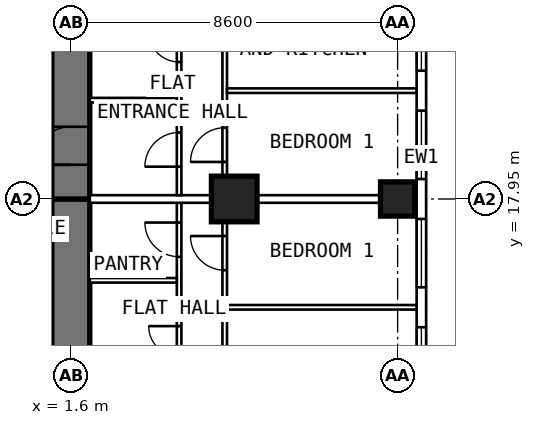
"""IFC4 building model, lengths in metres.
Left out: names, types, materials, properties, quantities, classifications, styles, units other than length and angle.
Written with IfcOpenShell. Run it as: python <this file> out.ifc"""

import sys

from ifc_helpers import new_model, si_unit, direction, frame, frame_2d, origin, origin_2d, place, context, subcontext, project, spatial, rectangle, extrude, element, fill, save


model = new_model("IFC4")
c1 = context("Model", 3, precision=1e-05, world=origin(), true_north=direction((0.0, 1.0)))
c2 = subcontext(c1, "Body", "Model", "MODEL_VIEW")
j1 = project(units=[si_unit("LENGTHUNIT", "METRE"), si_unit("PLANEANGLEUNIT", "RADIAN")], contexts=[c1])
p1 = place(None, origin())
s1 = spatial("IfcSite", under=j1, at=p1, CompositionType="ELEMENT")
p2 = place(p1, origin())
s2 = spatial("IfcBuilding", under=s1, at=p2, CompositionType="ELEMENT")
p3 = place(p2, frame((0.0, 0.0, 91.6)))
s3 = spatial("IfcBuildingStorey", under=s2, at=p3, CompositionType="ELEMENT", Elevation=91.6)
p4 = place(p3, frame((10.2, 17.95, 0.0), z_axis=(0.0, 0.0, 1.0), x_axis=(0.0, 1.0, 0.0)))
e1 = element("IfcColumn", 1, at=p4, inside=s3, PredefinedType="COLUMN", context=c2, shape_type="SweptSolid", body=[
    extrude(rectangle(XDim=0.9, YDim=0.9, at=origin_2d()), origin(), (0.0, 0.0, 1.0), 3.6),
])
p5 = place(p3, frame((5.9, 17.95, 0.0), z_axis=(0.0, 0.0, 1.0), x_axis=(0.0, 1.0, 0.0)))
e2 = element("IfcColumn", 2, at=p5, inside=s3, PredefinedType="COLUMN", context=c2, shape_type="SweptSolid", body=[
    extrude(rectangle(XDim=1.2, YDim=1.2, at=origin_2d()), origin(), (0.0, 0.0, 1.0), 3.6),
])
p6 = place(p3, frame((1.6, 9.6, 0.0), z_axis=(0.0, 0.0, 1.0), x_axis=(0.0, 1.0, 0.0)))
e3 = element("IfcWall", 3, at=p6, inside=s3, PredefinedType="SHEAR", context=c2, shape_type="SweptSolid", body=[
    extrude(rectangle(XDim=8.35, YDim=1.0, at=frame_2d((4.175, 0.0))), origin(), (0.0, 0.0, 1.0), 3.6),
])
p7 = place(p6, frame((1.3, 0.0, 0.0)))
e4 = element("IfcOpeningElement", 4, at=p7, cuts=e3, PredefinedType="OPENING", context=c2, shape_type="SweptSolid", body=[
    extrude(rectangle(XDim=1.0, YDim=2.1, at=frame_2d((0.5, 1.05))), frame((0.0, 0.512, 0.0), z_axis=(0.0, -1.0, 0.0), x_axis=(1.0, 0.0, 0.0)), (0.0, 0.0, 1.0), 1.024),
])
p8 = place(p3, frame((1.6, 17.95, 0.0), z_axis=(0.0, 0.0, 1.0), x_axis=(0.0, 1.0, 0.0)))
e5 = element("IfcWall", 5, at=p8, inside=s3, PredefinedType="SHEAR", context=c2, shape_type="SweptSolid", body=[
    extrude(rectangle(XDim=5.7, YDim=1.0, at=frame_2d((2.85, 0.0))), origin(), (0.0, 0.0, 1.0), 3.6),
])
p9 = place(p8, frame((0.9, 0.0, 0.0)))
e6 = element("IfcOpeningElement", 6, at=p9, cuts=e5, PredefinedType="OPENING", context=c2, shape_type="SweptSolid", body=[
    extrude(rectangle(XDim=1.0, YDim=2.1, at=frame_2d((0.5, 1.05))), frame((0.0, 0.512, 0.0), z_axis=(0.0, -1.0, 0.0), x_axis=(1.0, 0.0, 0.0)), (0.0, 0.0, 1.0), 1.024),
])
p10 = place(p3, frame((10.825, 6.409, 0.0), z_axis=(0.0, 0.0, 1.0), x_axis=(0.0, 1.0, 0.0)))
e7 = element("IfcWall", 7, at=p10, inside=s3, PredefinedType="SOLIDWALL", context=c2, shape_type="SweptSolid", body=[
    extrude(rectangle(XDim=25.226, YDim=0.25, at=frame_2d((12.613, 0.0))), origin(), (0.0, 0.0, 1.0), 3.35),
])
p11 = place(p10, frame((0.666, 0.0, 0.8)))
e8 = element("IfcOpeningElement", 8, at=p11, cuts=e7, PredefinedType="OPENING", context=c2, shape_type="SweptSolid", body=[
    extrude(rectangle(XDim=1.8, YDim=1.8, at=frame_2d((0.9, 0.9))), frame((0.0, 0.137, 0.0), z_axis=(0.0, -1.0, 0.0), x_axis=(1.0, 0.0, 0.0)), (0.0, 0.0, 1.0), 0.274),
])
p12 = place(p10, frame((3.516, 0.0, 0.8)))
e9 = element("IfcOpeningElement", 9, at=p12, cuts=e7, PredefinedType="OPENING", context=c2, shape_type="SweptSolid", body=[
    extrude(rectangle(XDim=1.8, YDim=1.8, at=frame_2d((0.9, 0.9))), frame((0.0, 0.137, 0.0), z_axis=(0.0, -1.0, 0.0), x_axis=(1.0, 0.0, 0.0)), (0.0, 0.0, 1.0), 0.274),
])
p13 = place(p10, frame((6.366, 0.0, 0.8)))
e10 = element("IfcOpeningElement", 10, at=p13, cuts=e7, PredefinedType="OPENING", context=c2, shape_type="SweptSolid", body=[
    extrude(rectangle(XDim=1.8, YDim=1.8, at=frame_2d((0.9, 0.9))), frame((0.0, 0.137, 0.0), z_axis=(0.0, -1.0, 0.0), x_axis=(1.0, 0.0, 0.0)), (0.0, 0.0, 1.0), 0.274),
])
p14 = place(p10, frame((9.216, 0.0, 0.8)))
e11 = element("IfcOpeningElement", 11, at=p14, cuts=e7, PredefinedType="OPENING", context=c2, shape_type="SweptSolid", body=[
    extrude(rectangle(XDim=1.8, YDim=1.8, at=frame_2d((0.9, 0.9))), frame((0.0, 0.137, 0.0), z_axis=(0.0, -1.0, 0.0), x_axis=(1.0, 0.0, 0.0)), (0.0, 0.0, 1.0), 0.274),
])
p15 = place(p10, frame((12.066, 0.0, 0.8)))
e12 = element("IfcOpeningElement", 12, at=p15, cuts=e7, PredefinedType="OPENING", context=c2, shape_type="SweptSolid", body=[
    extrude(rectangle(XDim=1.8, YDim=1.8, at=frame_2d((0.9, 0.9))), frame((0.0, 0.137, 0.0), z_axis=(0.0, -1.0, 0.0), x_axis=(1.0, 0.0, 0.0)), (0.0, 0.0, 1.0), 0.274),
])
p16 = place(p10, frame((14.916, 0.0, 0.8)))
e13 = element("IfcOpeningElement", 13, at=p16, cuts=e7, PredefinedType="OPENING", context=c2, shape_type="SweptSolid", body=[
    extrude(rectangle(XDim=1.8, YDim=1.8, at=frame_2d((0.9, 0.9))), frame((0.0, 0.137, 0.0), z_axis=(0.0, -1.0, 0.0), x_axis=(1.0, 0.0, 0.0)), (0.0, 0.0, 1.0), 0.274),
])
p17 = place(p10, frame((17.766, 0.0, 0.8)))
e14 = element("IfcOpeningElement", 14, at=p17, cuts=e7, PredefinedType="OPENING", context=c2, shape_type="SweptSolid", body=[
    extrude(rectangle(XDim=1.8, YDim=1.8, at=frame_2d((0.9, 0.9))), frame((0.0, 0.137, 0.0), z_axis=(0.0, -1.0, 0.0), x_axis=(1.0, 0.0, 0.0)), (0.0, 0.0, 1.0), 0.274),
])
p18 = place(p10, frame((20.616, 0.0, 0.8)))
e15 = element("IfcOpeningElement", 15, at=p18, cuts=e7, PredefinedType="OPENING", context=c2, shape_type="SweptSolid", body=[
    extrude(rectangle(XDim=1.8, YDim=1.8, at=frame_2d((0.9, 0.9))), frame((0.0, 0.137, 0.0), z_axis=(0.0, -1.0, 0.0), x_axis=(1.0, 0.0, 0.0)), (0.0, 0.0, 1.0), 0.274),
])
p19 = place(p3, frame((4.45, 10.1, 0.0), z_axis=(0.0, 0.0, 1.0), x_axis=(0.0, 1.0, 0.0)))
e16 = element("IfcWall", 16, at=p19, inside=s3, PredefinedType="PARTITIONING", context=c2, shape_type="SweptSolid", body=[
    extrude(rectangle(XDim=7.75, YDim=0.12, at=frame_2d((3.875, 0.0))), origin(), (0.0, 0.0, 1.0), 3.35),
])
p20 = place(p19, frame((0.75, 0.0, 0.0)))
e17 = element("IfcOpeningElement", 17, at=p20, cuts=e16, PredefinedType="OPENING", context=c2, shape_type="SweptSolid", body=[
    extrude(rectangle(XDim=0.9, YDim=2.1, at=frame_2d((0.45, 1.05))), frame((0.0, 0.072, 0.0), z_axis=(0.0, -1.0, 0.0), x_axis=(1.0, 0.0, 0.0)), (0.0, 0.0, 1.0), 0.144),
])
p21 = place(p19, frame((3.705, 0.0, 0.0)))
e18 = element("IfcOpeningElement", 18, at=p21, cuts=e16, PredefinedType="OPENING", context=c2, shape_type="SweptSolid", body=[
    extrude(rectangle(XDim=0.8, YDim=2.1, at=frame_2d((0.4, 1.05))), frame((0.0, 0.072, 0.0), z_axis=(0.0, -1.0, 0.0), x_axis=(1.0, 0.0, 0.0)), (0.0, 0.0, 1.0), 0.144),
])
p22 = place(p19, frame((6.33, 0.0, 0.0)))
e19 = element("IfcOpeningElement", 19, at=p22, cuts=e16, PredefinedType="OPENING", context=c2, shape_type="SweptSolid", body=[
    extrude(rectangle(XDim=0.9, YDim=2.1, at=frame_2d((0.45, 1.05))), frame((0.0, 0.072, 0.0), z_axis=(0.0, -1.0, 0.0), x_axis=(1.0, 0.0, 0.0)), (0.0, 0.0, 1.0), 0.144),
])
p23 = place(p3, frame((5.65, 9.6, 0.0), z_axis=(0.0, 0.0, 1.0), x_axis=(0.0, 1.0, 0.0)))
e20 = element("IfcWall", 20, at=p23, inside=s3, PredefinedType="PARTITIONING", context=c2, shape_type="SweptSolid", body=[
    extrude(rectangle(XDim=8.1, YDim=0.12, at=frame_2d((4.05, 0.0))), origin(), (0.0, 0.0, 1.0), 3.35),
])
p24 = place(p23, frame((3.4, 0.0, 0.0)))
e21 = element("IfcOpeningElement", 21, at=p24, cuts=e20, PredefinedType="OPENING", context=c2, shape_type="SweptSolid", body=[
    extrude(rectangle(XDim=0.9, YDim=2.1, at=frame_2d((0.45, 1.05))), frame((0.0, 0.072, 0.0), z_axis=(0.0, -1.0, 0.0), x_axis=(1.0, 0.0, 0.0)), (0.0, 0.0, 1.0), 0.144),
])
p25 = place(p23, frame((6.475, 0.0, 0.0)))
e22 = element("IfcOpeningElement", 22, at=p25, cuts=e20, PredefinedType="OPENING", context=c2, shape_type="SweptSolid", body=[
    extrude(rectangle(XDim=0.9, YDim=2.1, at=frame_2d((0.45, 1.05))), frame((0.0, 0.072, 0.0), z_axis=(0.0, -1.0, 0.0), x_axis=(1.0, 0.0, 0.0)), (0.0, 0.0, 1.0), 0.144),
])
p26 = place(p3, frame((5.71, 15.1, 0.0), z_axis=(0.0, 0.0, 1.0), x_axis=(1.0, 0.0, 0.0)))
e23 = element("IfcWall", 23, at=p26, inside=s3, PredefinedType="PARTITIONING", context=c2, shape_type="SweptSolid", body=[
    extrude(rectangle(XDim=4.99, YDim=0.12, at=frame_2d((2.495, 0.0))), origin(), (0.0, 0.0, 1.0), 3.35),
])
p27 = place(p3, frame((2.1, 15.81, 0.0), z_axis=(0.0, 0.0, 1.0), x_axis=(1.0, 0.0, 0.0)))
e24 = element("IfcWall", 24, at=p27, inside=s3, PredefinedType="PARTITIONING", context=c2, shape_type="SweptSolid", body=[
    extrude(rectangle(XDim=2.29, YDim=0.12, at=frame_2d((1.145, 0.0))), origin(), (0.0, 0.0, 1.0), 3.35),
])
p28 = place(p3, frame((4.45, 18.05, 0.0), z_axis=(0.0, 0.0, 1.0), x_axis=(0.0, 1.0, 0.0)))
e25 = element("IfcWall", 25, at=p28, inside=s3, PredefinedType="PARTITIONING", context=c2, shape_type="SweptSolid", body=[
    extrude(rectangle(XDim=16.345, YDim=0.12, at=frame_2d((8.172, 0.0))), origin(), (0.0, 0.0, 1.0), 3.35),
])
p29 = place(p28, frame((0.75, 0.0, 0.0)))
e26 = element("IfcOpeningElement", 26, at=p29, cuts=e25, PredefinedType="OPENING", context=c2, shape_type="SweptSolid", body=[
    extrude(rectangle(XDim=0.9, YDim=2.1, at=frame_2d((0.45, 1.05))), frame((0.0, 0.072, 0.0), z_axis=(0.0, -1.0, 0.0), x_axis=(1.0, 0.0, 0.0)), (0.0, 0.0, 1.0), 0.144),
])
p30 = place(p28, frame((3.505, 0.0, 0.0)))
e27 = element("IfcOpeningElement", 27, at=p30, cuts=e25, PredefinedType="OPENING", context=c2, shape_type="SweptSolid", body=[
    extrude(rectangle(XDim=0.8, YDim=2.1, at=frame_2d((0.4, 1.05))), frame((0.0, 0.072, 0.0), z_axis=(0.0, -1.0, 0.0), x_axis=(1.0, 0.0, 0.0)), (0.0, 0.0, 1.0), 0.144),
])
p31 = place(p28, frame((5.847, 0.0, 0.0)))
e28 = element("IfcOpeningElement", 28, at=p31, cuts=e25, PredefinedType="OPENING", context=c2, shape_type="SweptSolid", body=[
    extrude(rectangle(XDim=0.8, YDim=2.1, at=frame_2d((0.4, 1.05))), frame((0.0, 0.072, 0.0), z_axis=(0.0, -1.0, 0.0), x_axis=(1.0, 0.0, 0.0)), (0.0, 0.0, 1.0), 0.144),
])
p32 = place(p28, frame((7.67, 0.0, 0.0)))
e29 = element("IfcOpeningElement", 29, at=p32, cuts=e25, PredefinedType="OPENING", context=c2, shape_type="SweptSolid", body=[
    extrude(rectangle(XDim=0.9, YDim=2.1, at=frame_2d((0.45, 1.05))), frame((0.0, 0.072, 0.0), z_axis=(0.0, -1.0, 0.0), x_axis=(1.0, 0.0, 0.0)), (0.0, 0.0, 1.0), 0.144),
])
p33 = place(p28, frame((9.593, 0.0, 0.0)))
e30 = element("IfcOpeningElement", 30, at=p33, cuts=e25, PredefinedType="OPENING", context=c2, shape_type="SweptSolid", body=[
    extrude(rectangle(XDim=0.8, YDim=2.1, at=frame_2d((0.4, 1.05))), frame((0.0, 0.072, 0.0), z_axis=(0.0, -1.0, 0.0), x_axis=(1.0, 0.0, 0.0)), (0.0, 0.0, 1.0), 0.144),
])
p34 = place(p28, frame((11.467, 0.0, 0.0)))
e31 = element("IfcOpeningElement", 31, at=p34, cuts=e25, PredefinedType="OPENING", context=c2, shape_type="SweptSolid", body=[
    extrude(rectangle(XDim=0.8, YDim=2.1, at=frame_2d((0.4, 1.05))), frame((0.0, 0.072, 0.0), z_axis=(0.0, -1.0, 0.0), x_axis=(1.0, 0.0, 0.0)), (0.0, 0.0, 1.0), 0.144),
])
p35 = place(p28, frame((13.29, 0.0, 0.0)))
e32 = element("IfcOpeningElement", 32, at=p35, cuts=e25, PredefinedType="OPENING", context=c2, shape_type="SweptSolid", body=[
    extrude(rectangle(XDim=0.9, YDim=2.1, at=frame_2d((0.45, 1.05))), frame((0.0, 0.072, 0.0), z_axis=(0.0, -1.0, 0.0), x_axis=(1.0, 0.0, 0.0)), (0.0, 0.0, 1.0), 0.144),
])
p36 = place(p28, frame((14.837, 0.0, 0.0)))
e33 = element("IfcOpeningElement", 33, at=p36, cuts=e25, PredefinedType="OPENING", context=c2, shape_type="SweptSolid", body=[
    extrude(rectangle(XDim=0.9, YDim=2.1, at=frame_2d((0.45, 1.05))), frame((0.0, 0.072, 0.0), z_axis=(0.0, -1.0, 0.0), x_axis=(1.0, 0.0, 0.0)), (0.0, 0.0, 1.0), 0.144),
])
p37 = place(p3, frame((5.65, 18.05, 0.0), z_axis=(0.0, 0.0, 1.0), x_axis=(0.0, 1.0, 0.0)))
e34 = element("IfcWall", 34, at=p37, inside=s3, PredefinedType="PARTITIONING", context=c2, shape_type="SweptSolid", body=[
    extrude(rectangle(XDim=16.345, YDim=0.12, at=frame_2d((8.172, 0.0))), origin(), (0.0, 0.0, 1.0), 3.35),
])
p38 = place(p37, frame((0.875, 0.0, 0.0)))
e35 = element("IfcOpeningElement", 35, at=p38, cuts=e34, PredefinedType="OPENING", context=c2, shape_type="SweptSolid", body=[
    extrude(rectangle(XDim=0.9, YDim=2.1, at=frame_2d((0.45, 1.05))), frame((0.0, 0.072, 0.0), z_axis=(0.0, -1.0, 0.0), x_axis=(1.0, 0.0, 0.0)), (0.0, 0.0, 1.0), 0.144),
])
p39 = place(p37, frame((3.95, 0.0, 0.0)))
e36 = element("IfcOpeningElement", 36, at=p39, cuts=e34, PredefinedType="OPENING", context=c2, shape_type="SweptSolid", body=[
    extrude(rectangle(XDim=0.9, YDim=2.1, at=frame_2d((0.45, 1.05))), frame((0.0, 0.072, 0.0), z_axis=(0.0, -1.0, 0.0), x_axis=(1.0, 0.0, 0.0)), (0.0, 0.0, 1.0), 0.144),
])
p40 = place(p37, frame((9.425, 0.0, 0.0)))
e37 = element("IfcOpeningElement", 37, at=p40, cuts=e34, PredefinedType="OPENING", context=c2, shape_type="SweptSolid", body=[
    extrude(rectangle(XDim=0.9, YDim=2.1, at=frame_2d((0.45, 1.05))), frame((0.0, 0.072, 0.0), z_axis=(0.0, -1.0, 0.0), x_axis=(1.0, 0.0, 0.0)), (0.0, 0.0, 1.0), 0.144),
])
p41 = place(p37, frame((12.05, 0.0, 0.0)))
e38 = element("IfcOpeningElement", 38, at=p41, cuts=e34, PredefinedType="OPENING", context=c2, shape_type="SweptSolid", body=[
    extrude(rectangle(XDim=0.9, YDim=2.1, at=frame_2d((0.45, 1.05))), frame((0.0, 0.072, 0.0), z_axis=(0.0, -1.0, 0.0), x_axis=(1.0, 0.0, 0.0)), (0.0, 0.0, 1.0), 0.144),
])
p42 = place(p3, frame((5.71, 20.8, 0.0), z_axis=(0.0, 0.0, 1.0), x_axis=(1.0, 0.0, 0.0)))
e39 = element("IfcWall", 39, at=p42, inside=s3, PredefinedType="PARTITIONING", context=c2, shape_type="SweptSolid", body=[
    extrude(rectangle(XDim=4.99, YDim=0.12, at=frame_2d((2.495, 0.0))), origin(), (0.0, 0.0, 1.0), 3.35),
])
p43 = place(p3, frame((2.1, 20.55, 0.0), z_axis=(0.0, 0.0, 1.0), x_axis=(1.0, 0.0, 0.0)))
e40 = element("IfcWall", 40, at=p43, inside=s3, PredefinedType="PARTITIONING", context=c2, shape_type="SweptSolid", body=[
    extrude(rectangle(XDim=2.29, YDim=0.12, at=frame_2d((1.145, 0.0))), origin(), (0.0, 0.0, 1.0), 3.35),
])
p44 = place(p3, frame((2.1, 17.95, 0.0), z_axis=(0.0, 0.0, 1.0), x_axis=(1.0, 0.0, 0.0)))
e41 = element("IfcWall", 41, at=p44, inside=s3, PredefinedType="PARTITIONING", context=c2, shape_type="SweptSolid", body=[
    extrude(rectangle(XDim=8.6, YDim=0.2, at=frame_2d((4.3, 0.0))), origin(), (0.0, 0.0, 1.0), 2.45),
])
p45 = place(p13, origin())
e42 = element("IfcWindow", 42, at=p45, inside=s3, PartitioningType="SINGLE_PANEL", PredefinedType="WINDOW", context=c2, shape_type="SweptSolid", body=[
    extrude(rectangle(XDim=1.8, YDim=1.8, at=frame_2d((0.9, 0.9))), frame((0.0, 0.03, 0.0), z_axis=(0.0, -1.0, 0.0), x_axis=(1.0, 0.0, 0.0)), (0.0, 0.0, 1.0), 0.06),
])
fill(e10, e42)
p46 = place(p14, origin())
e43 = element("IfcWindow", 43, at=p46, inside=s3, PartitioningType="SINGLE_PANEL", PredefinedType="WINDOW", context=c2, shape_type="SweptSolid", body=[
    extrude(rectangle(XDim=1.8, YDim=1.8, at=frame_2d((0.9, 0.9))), frame((0.0, 0.03, 0.0), z_axis=(0.0, -1.0, 0.0), x_axis=(1.0, 0.0, 0.0)), (0.0, 0.0, 1.0), 0.06),
])
fill(e11, e43)
p47 = place(p15, origin())
e44 = element("IfcWindow", 44, at=p47, inside=s3, PartitioningType="SINGLE_PANEL", PredefinedType="WINDOW", context=c2, shape_type="SweptSolid", body=[
    extrude(rectangle(XDim=1.8, YDim=1.8, at=frame_2d((0.9, 0.9))), frame((0.0, 0.03, 0.0), z_axis=(0.0, -1.0, 0.0), x_axis=(1.0, 0.0, 0.0)), (0.0, 0.0, 1.0), 0.06),
])
fill(e12, e44)
p48 = place(p16, origin())
e45 = element("IfcWindow", 45, at=p48, inside=s3, PartitioningType="SINGLE_PANEL", PredefinedType="WINDOW", context=c2, shape_type="SweptSolid", body=[
    extrude(rectangle(XDim=1.8, YDim=1.8, at=frame_2d((0.9, 0.9))), frame((0.0, 0.03, 0.0), z_axis=(0.0, -1.0, 0.0), x_axis=(1.0, 0.0, 0.0)), (0.0, 0.0, 1.0), 0.06),
])
fill(e13, e45)
p49 = place(p25, origin())
e46 = element("IfcDoor", 46, at=p49, inside=s3, OperationType="SINGLE_SWING_RIGHT", PredefinedType="DOOR", context=c2, shape_type="SweptSolid", body=[
    extrude(rectangle(XDim=0.9, YDim=2.1, at=frame_2d((0.45, 1.05))), frame((0.0, 0.025, 0.0), z_axis=(0.0, -1.0, 0.0), x_axis=(1.0, 0.0, 0.0)), (0.0, 0.0, 1.0), 0.05),
])
fill(e22, e46)
p50 = place(p21, origin())
e47 = element("IfcDoor", 47, at=p50, inside=s3, OperationType="SINGLE_SWING_RIGHT", PredefinedType="DOOR", context=c2, shape_type="SweptSolid", body=[
    extrude(rectangle(XDim=0.8, YDim=2.1, at=frame_2d((0.4, 1.05))), frame((0.0, 0.025, 0.0), z_axis=(0.0, -1.0, 0.0), x_axis=(1.0, 0.0, 0.0)), (0.0, 0.0, 1.0), 0.05),
])
fill(e18, e47)
p51 = place(p22, origin())
e48 = element("IfcDoor", 48, at=p51, inside=s3, OperationType="SINGLE_SWING_RIGHT", PredefinedType="DOOR", context=c2, shape_type="SweptSolid", body=[
    extrude(rectangle(XDim=0.9, YDim=2.1, at=frame_2d((0.45, 1.05))), frame((0.0, 0.025, 0.0), z_axis=(0.0, -1.0, 0.0), x_axis=(1.0, 0.0, 0.0)), (0.0, 0.0, 1.0), 0.05),
])
fill(e19, e48)
p52 = place(p9, origin())
e49 = element("IfcDoor", 49, at=p52, inside=s3, OperationType="SINGLE_SWING_LEFT", PredefinedType="DOOR", context=c2, shape_type="SweptSolid", body=[
    extrude(rectangle(XDim=1.0, YDim=2.1, at=frame_2d((0.5, 1.05))), frame((0.0, 0.25, 0.0), z_axis=(0.0, -1.0, 0.0), x_axis=(1.0, 0.0, 0.0)), (0.0, 0.0, 1.0), 0.5),
])
fill(e6, e49)
p53 = place(p38, origin())
e50 = element("IfcDoor", 50, at=p53, inside=s3, OperationType="SINGLE_SWING_LEFT", PredefinedType="DOOR", context=c2, shape_type="SweptSolid", body=[
    extrude(rectangle(XDim=0.9, YDim=2.1, at=frame_2d((0.45, 1.05))), frame((0.0, 0.025, 0.0), z_axis=(0.0, -1.0, 0.0), x_axis=(1.0, 0.0, 0.0)), (0.0, 0.0, 1.0), 0.05),
])
fill(e35, e50)
p54 = place(p29, origin())
e51 = element("IfcDoor", 51, at=p54, inside=s3, OperationType="SINGLE_SWING_LEFT", PredefinedType="DOOR", context=c2, shape_type="SweptSolid", body=[
    extrude(rectangle(XDim=0.9, YDim=2.1, at=frame_2d((0.45, 1.05))), frame((0.0, 0.025, 0.0), z_axis=(0.0, -1.0, 0.0), x_axis=(1.0, 0.0, 0.0)), (0.0, 0.0, 1.0), 0.05),
])
fill(e26, e51)
p55 = place(p30, origin())
e52 = element("IfcDoor", 52, at=p55, inside=s3, OperationType="SINGLE_SWING_RIGHT", PredefinedType="DOOR", context=c2, shape_type="SweptSolid", body=[
    extrude(rectangle(XDim=0.8, YDim=2.1, at=frame_2d((0.4, 1.05))), frame((0.0, 0.025, 0.0), z_axis=(0.0, -1.0, 0.0), x_axis=(1.0, 0.0, 0.0)), (0.0, 0.0, 1.0), 0.05),
])
fill(e27, e52)
save(model, sys.argv[1])
